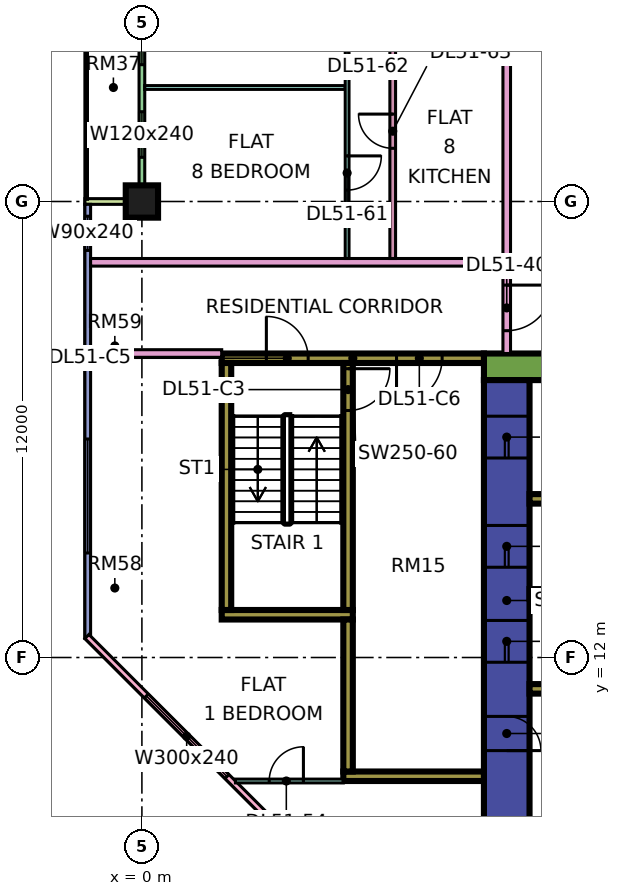
"""IFC4 building model, lengths in metres.
Left out: names, types, materials, properties, quantities, classifications, styles, units other than length and angle.
Written with IfcOpenShell. Run it as: python <this file> out.ifc"""

import sys

from ifc_helpers import new_model, si_unit, direction, frame, frame_2d, origin, origin_2d, place, context, subcontext, project, spatial, rectangle, extrude, element, fill, save


model = new_model("IFC4")
c1 = context("Model", 3, precision=1e-05, world=origin(), true_north=direction((0.0, 1.0)))
c2 = subcontext(c1, "Body", "Model", "MODEL_VIEW")
j1 = project(units=[si_unit("LENGTHUNIT", "METRE"), si_unit("PLANEANGLEUNIT", "RADIAN")], contexts=[c1])
p1 = place(None, origin())
s1 = spatial("IfcSite", under=j1, at=p1, CompositionType="ELEMENT")
p2 = place(p1, origin())
s2 = spatial("IfcBuilding", under=s1, at=p2, CompositionType="ELEMENT")
p3 = place(p2, frame((0.0, 0.0, 219.15)))
s3 = spatial("IfcBuildingStorey", under=s2, at=p3, CompositionType="ELEMENT", Elevation=219.15)
p4 = place(p3, frame((0.0, 24.0, 0.0), z_axis=(0.0, 0.0, 1.0), x_axis=(1.0, 0.0, 0.0)))
e1 = element("IfcColumn", 1, at=p4, inside=s3, PredefinedType="COLUMN", context=c2, shape_type="SweptSolid", body=[
    extrude(rectangle(XDim=0.85, YDim=0.85, at=origin_2d()), origin(), (0.0, 0.0, 1.0), 3.75),
])
p5 = place(p3, frame((9.0, 19.65, 0.0), z_axis=(0.0, 0.0, 1.0), x_axis=(1.0, 0.0, 0.0)))
e2 = element("IfcWall", 2, at=p5, inside=s3, PredefinedType="SHEAR", context=c2, shape_type="SweptSolid", body=[
    extrude(rectangle(XDim=25.0, YDim=0.7, at=frame_2d((12.5, 0.0))), origin(), (0.0, 0.0, 1.0), 3.75),
])
p6 = place(p5, frame((19.1, 0.0, 0.0)))
e3 = element("IfcOpeningElement", 3, at=p6, cuts=e2, PredefinedType="OPENING", context=c2, shape_type="SweptSolid", body=[
    extrude(rectangle(XDim=1.8, YDim=2.4, at=frame_2d((0.9, 1.2))), frame((0.0, 0.36, 0.0), z_axis=(0.0, -1.0, 0.0), x_axis=(1.0, 0.0, 0.0)), (0.0, 0.0, 1.0), 0.72),
])
p7 = place(p3, frame((9.6, 7.7, 0.0), z_axis=(0.0, 0.0, 1.0), x_axis=(0.0, 1.0, 0.0)))
e4 = element("IfcWall", 4, at=p7, inside=s3, PredefinedType="SHEAR", context=c2, shape_type="SweptSolid", body=[
    extrude(rectangle(XDim=11.6, YDim=1.2, at=frame_2d((5.8, 0.0))), origin(), (0.0, 0.0, 1.0), 3.75),
])
p8 = place(p7, frame((4.175, 0.0, 0.0)))
e5 = element("IfcOpeningElement", 5, at=p8, cuts=e4, PredefinedType="OPENING", context=c2, shape_type="SweptSolid", body=[
    extrude(rectangle(XDim=1.1, YDim=2.2, at=frame_2d((0.55, 1.1))), frame((0.0, 0.61, 0.0), z_axis=(0.0, -1.0, 0.0), x_axis=(1.0, 0.0, 0.0)), (0.0, 0.0, 1.0), 1.22),
])
p9 = place(p7, frame((6.675, 0.0, 0.0)))
e6 = element("IfcOpeningElement", 6, at=p9, cuts=e4, PredefinedType="OPENING", context=c2, shape_type="SweptSolid", body=[
    extrude(rectangle(XDim=1.1, YDim=2.2, at=frame_2d((0.55, 1.1))), frame((0.0, 0.61, 0.0), z_axis=(0.0, -1.0, 0.0), x_axis=(1.0, 0.0, 0.0)), (0.0, 0.0, 1.0), 1.22),
])
p10 = place(p7, frame((9.55, 0.0, 0.0)))
e7 = element("IfcOpeningElement", 7, at=p10, cuts=e4, PredefinedType="OPENING", context=c2, shape_type="SweptSolid", body=[
    extrude(rectangle(XDim=1.1, YDim=2.2, at=frame_2d((0.55, 1.1))), frame((0.0, 0.61, 0.0), z_axis=(0.0, -1.0, 0.0), x_axis=(1.0, 0.0, 0.0)), (0.0, 0.0, 1.0), 1.22),
])
p11 = place(p7, frame((1.85, 0.0, 0.0)))
e8 = element("IfcOpeningElement", 8, at=p11, cuts=e4, PredefinedType="OPENING", context=c2, shape_type="SweptSolid", body=[
    extrude(rectangle(XDim=0.9, YDim=2.1, at=frame_2d((0.45, 1.05))), frame((0.0, 0.61, 0.0), z_axis=(0.0, -1.0, 0.0), x_axis=(1.0, 0.0, 0.0)), (0.0, 0.0, 1.0), 1.22),
])
for number, where, z_axis, x_axis in (
    (9, (10.2, 11.175, 0.0), (0.0, 0.0, 1.0), (1.0, 0.0, 0.0)),
    (10, (10.2, 13.675, 0.0), (0.0, 0.0, 1.0), (1.0, 0.0, 0.0)),
    (11, (10.2, 16.175, 0.0), (0.0, 0.0, 1.0), (1.0, 0.0, 0.0)),
):
    element("IfcWall", number, at=place(p3, frame(where, z_axis=z_axis, x_axis=x_axis)), inside=s3, PredefinedType="SHEAR", context=c2, shape_type="SweptSolid", body=[
        extrude(rectangle(XDim=3.0, YDim=0.25, at=frame_2d((1.5, 0.0))), origin(), (0.0, 0.0, 1.0), 3.75),
    ])
p12 = place(p3, frame((2.1, 19.875, 0.0), z_axis=(0.0, 0.0, 1.0), x_axis=(1.0, 0.0, 0.0)))
e12 = element("IfcWall", 12, at=p12, inside=s3, PredefinedType="SHEAR", context=c2, shape_type="SweptSolid", body=[
    extrude(rectangle(XDim=6.9, YDim=0.25, at=frame_2d((3.45, 0.0))), origin(), (0.0, 0.0, 1.0), 3.75),
])
p13 = place(p12, frame((1.175, 0.0, 0.0)))
e13 = element("IfcOpeningElement", 13, at=p13, cuts=e12, PredefinedType="OPENING", context=c2, shape_type="SweptSolid", body=[
    extrude(rectangle(XDim=1.1, YDim=2.2, at=frame_2d((0.55, 1.1))), frame((0.0, 0.135, 0.0), z_axis=(0.0, -1.0, 0.0), x_axis=(1.0, 0.0, 0.0)), (0.0, 0.0, 1.0), 0.27),
])
p14 = place(p12, frame((4.6, 0.0, 0.0)))
e14 = element("IfcOpeningElement", 14, at=p14, cuts=e12, PredefinedType="OPENING", context=c2, shape_type="SweptSolid", body=[
    extrude(rectangle(XDim=1.2, YDim=2.2, at=frame_2d((0.6, 1.1))), frame((0.0, 0.135, 0.0), z_axis=(0.0, -1.0, 0.0), x_axis=(1.0, 0.0, 0.0)), (0.0, 0.0, 1.0), 0.27),
])
p15 = place(p3, frame((2.1, 13.125, 0.0), z_axis=(0.0, 0.0, 1.0), x_axis=(1.0, 0.0, 0.0)))
e15 = element("IfcWall", 15, at=p15, inside=s3, PredefinedType="SHEAR", context=c2, shape_type="SweptSolid", body=[
    extrude(rectangle(XDim=3.45, YDim=0.25, at=frame_2d((1.725, 0.0))), origin(), (0.0, 0.0, 1.0), 3.75),
])
p16 = place(p3, frame((2.225, 13.25, 0.0), z_axis=(0.0, 0.0, 1.0), x_axis=(0.0, 1.0, 0.0)))
e16 = element("IfcWall", 16, at=p16, inside=s3, PredefinedType="SHEAR", context=c2, shape_type="SweptSolid", body=[
    extrude(rectangle(XDim=6.5, YDim=0.25, at=frame_2d((3.25, 0.0))), origin(), (0.0, 0.0, 1.0), 3.75),
])
p17 = place(p3, frame((5.425, 13.25, 0.0), z_axis=(0.0, 0.0, 1.0), x_axis=(0.0, 1.0, 0.0)))
e17 = element("IfcWall", 17, at=p17, inside=s3, PredefinedType="SHEAR", context=c2, shape_type="SweptSolid", body=[
    extrude(rectangle(XDim=6.5, YDim=0.25, at=frame_2d((3.25, 0.0))), origin(), (0.0, 0.0, 1.0), 3.75),
])
p18 = place(p17, frame((5.25, 0.0, 0.0)))
e18 = element("IfcOpeningElement", 18, at=p18, cuts=e17, PredefinedType="OPENING", context=c2, shape_type="SweptSolid", body=[
    extrude(rectangle(XDim=1.1, YDim=2.2, at=frame_2d((0.55, 1.1))), frame((0.0, 0.135, 0.0), z_axis=(0.0, -1.0, 0.0), x_axis=(1.0, 0.0, 0.0)), (0.0, 0.0, 1.0), 0.27),
])
p19 = place(p3, frame((5.3, 8.875, 0.0), z_axis=(0.0, 0.0, 1.0), x_axis=(1.0, 0.0, 0.0)))
e19 = element("IfcWall", 19, at=p19, inside=s3, PredefinedType="SHEAR", context=c2, shape_type="SweptSolid", body=[
    extrude(rectangle(XDim=3.7, YDim=0.25, at=frame_2d((1.85, 0.0))), origin(), (0.0, 0.0, 1.0), 3.75),
])
p20 = place(p3, frame((5.425, 9.0, 0.0), z_axis=(0.0, 0.0, 1.0), x_axis=(0.0, 1.0, 0.0)))
e20 = element("IfcWall", 20, at=p20, inside=s3, PredefinedType="SHEAR", context=c2, shape_type="SweptSolid", body=[
    extrude(rectangle(XDim=4.0, YDim=0.25, at=frame_2d((2.0, 0.0))), origin(), (0.0, 0.0, 1.0), 3.75),
])
p21 = place(p3, frame((0.0, 35.925, 0.0), z_axis=(0.0, 0.0, 1.0), x_axis=(0.0, -1.0, 0.0)))
e21 = element("IfcWall", 21, at=p21, inside=s3, PredefinedType="SOLIDWALL", context=c2, shape_type="SweptSolid", body=[
    extrude(rectangle(XDim=11.85, YDim=0.15, at=frame_2d((5.925, 0.0))), origin(), (0.0, 0.0, 1.0), 3.35),
])
p22 = place(p21, frame((2.288, 0.0, 0.0)))
e22 = element("IfcOpeningElement", 22, at=p22, cuts=e21, PredefinedType="OPENING", context=c2, shape_type="SweptSolid", body=[
    extrude(rectangle(XDim=1.8, YDim=2.4, at=frame_2d((0.9, 1.2))), frame((0.0, 0.085, 0.0), z_axis=(0.0, -1.0, 0.0), x_axis=(1.0, 0.0, 0.0)), (0.0, 0.0, 1.0), 0.17),
])
p23 = place(p21, frame((6.525, 0.0, 0.45)))
e23 = element("IfcOpeningElement", 23, at=p23, cuts=e21, PredefinedType="OPENING", context=c2, shape_type="SweptSolid", body=[
    extrude(rectangle(XDim=1.8, YDim=2.4, at=frame_2d((0.9, 1.2))), frame((0.0, 0.085, 0.0), z_axis=(0.0, -1.0, 0.0), x_axis=(1.0, 0.0, 0.0)), (0.0, 0.0, 1.0), 0.17),
])
p24 = place(p21, frame((9.562, 0.0, 0.45)))
e24 = element("IfcOpeningElement", 24, at=p24, cuts=e21, PredefinedType="OPENING", context=c2, shape_type="SweptSolid", body=[
    extrude(rectangle(XDim=1.2, YDim=2.4, at=frame_2d((0.6, 1.2))), frame((0.0, 0.085, 0.0), z_axis=(0.0, -1.0, 0.0), x_axis=(1.0, 0.0, 0.0)), (0.0, 0.0, 1.0), 0.17),
])
p25 = place(p3, frame((-1.5, 24.0, 0.0), z_axis=(0.0, 0.0, 1.0), x_axis=(1.0, 0.0, 0.0)))
e25 = element("IfcWall", 25, at=p25, inside=s3, PredefinedType="SOLIDWALL", context=c2, shape_type="SweptSolid", body=[
    extrude(rectangle(XDim=1.5, YDim=0.15, at=frame_2d((0.75, 0.0))), origin(), (0.0, 0.0, 1.0), 3.35),
])
p26 = place(p3, frame((-1.425, 23.925, 0.0), z_axis=(0.0, 0.0, 1.0), x_axis=(0.0, -1.0, 0.0)))
e26 = element("IfcWall", 26, at=p26, inside=s3, PredefinedType="SOLIDWALL", context=c2, shape_type="SweptSolid", body=[
    extrude(rectangle(XDim=11.425, YDim=0.15, at=frame_2d((5.712, 0.0))), origin(), (0.0, 0.0, 1.0), 3.35),
])
p27 = place(p26, frame((0.312, 0.0, 0.45)))
e27 = element("IfcOpeningElement", 27, at=p27, cuts=e26, PredefinedType="OPENING", context=c2, shape_type="SweptSolid", body=[
    extrude(rectangle(XDim=0.9, YDim=2.4, at=frame_2d((0.45, 1.2))), frame((0.0, 0.085, 0.0), z_axis=(0.0, -1.0, 0.0), x_axis=(1.0, 0.0, 0.0)), (0.0, 0.0, 1.0), 0.17),
])
p28 = place(p26, frame((6.175, 0.0, 0.45)))
e28 = element("IfcOpeningElement", 28, at=p28, cuts=e26, PredefinedType="OPENING", context=c2, shape_type="SweptSolid", body=[
    extrude(rectangle(XDim=3.0, YDim=2.4, at=frame_2d((1.5, 1.2))), frame((0.0, 0.085, 0.0), z_axis=(0.0, -1.0, 0.0), x_axis=(1.0, 0.0, 0.0)), (0.0, 0.0, 1.0), 0.17),
])
p29 = place(p3, frame((-1.447, 12.553, 0.0), z_axis=(0.0, 0.0, 1.0), x_axis=(0.707106781187, -0.707106781187, 0.0)))
e29 = element("IfcWall", 29, at=p29, inside=s3, PredefinedType="SOLIDWALL", context=c2, shape_type="SweptSolid", body=[
    extrude(rectangle(XDim=19.799, YDim=0.15, at=frame_2d((9.899, 0.0))), origin(), (0.0, 0.0, 1.0), 3.35),
])
p30 = place(p29, frame((2.212, 0.0, 0.45)))
e30 = element("IfcOpeningElement", 30, at=p30, cuts=e29, PredefinedType="OPENING", context=c2, shape_type="SweptSolid", body=[
    extrude(rectangle(XDim=3.0, YDim=2.4, at=frame_2d((1.5, 1.2))), frame((0.0, 0.085, 0.0), z_axis=(0.0, -1.0, 0.0), x_axis=(1.0, 0.0, 0.0)), (0.0, 0.0, 1.0), 0.17),
])
p31 = place(p29, frame((10.216, 0.0, 0.45)))
e31 = element("IfcOpeningElement", 31, at=p31, cuts=e29, PredefinedType="OPENING", context=c2, shape_type="SweptSolid", body=[
    extrude(rectangle(XDim=3.0, YDim=2.4, at=frame_2d((1.5, 1.2))), frame((0.0, 0.085, 0.0), z_axis=(0.0, -1.0, 0.0), x_axis=(1.0, 0.0, 0.0)), (0.0, 0.0, 1.0), 0.17),
])
p32 = place(p3, frame((-1.35, 20.0, 0.0), z_axis=(0.0, 0.0, 1.0), x_axis=(1.0, 0.0, 0.0)))
e32 = element("IfcWall", 32, at=p32, inside=s3, PredefinedType="PARTITIONING", context=c2, shape_type="SweptSolid", body=[
    extrude(rectangle(XDim=3.45, YDim=0.2, at=frame_2d((1.725, 0.0))), origin(), (0.0, 0.0, 1.0), 3.35),
])
p33 = place(p3, frame((-1.35, 22.4, 0.0), z_axis=(0.0, 0.0, 1.0), x_axis=(1.0, 0.0, 0.0)))
e33 = element("IfcWall", 33, at=p33, inside=s3, PredefinedType="PARTITIONING", context=c2, shape_type="SweptSolid", body=[
    extrude(rectangle(XDim=10.85, YDim=0.2, at=frame_2d((5.425, 0.0))), origin(), (0.0, 0.0, 1.0), 3.35),
])
p34 = place(p3, frame((0.074, 27.0, 0.0), z_axis=(0.0, 0.0, 1.0), x_axis=(1.0, 0.0, 0.0)))
e34 = element("IfcWall", 34, at=p34, inside=s3, PredefinedType="PARTITIONING", context=c2, shape_type="SweptSolid", body=[
    extrude(rectangle(XDim=5.276, YDim=0.1, at=frame_2d((2.638, 0.0))), origin(), (0.0, 0.0, 1.0), 3.35),
])
p35 = place(p3, frame((2.461, 8.75, 0.0), z_axis=(0.0, 0.0, 1.0), x_axis=(1.0, 0.0, 0.0)))
e35 = element("IfcWall", 35, at=p35, inside=s3, PredefinedType="PARTITIONING", context=c2, shape_type="SweptSolid", body=[
    extrude(rectangle(XDim=2.839, YDim=0.1, at=frame_2d((1.419, 0.0))), origin(), (0.0, 0.0, 1.0), 3.35),
])
p36 = place(p35, frame((0.889, 0.0, 0.0)))
e36 = element("IfcOpeningElement", 36, at=p36, cuts=e35, PredefinedType="OPENING", context=c2, shape_type="SweptSolid", body=[
    extrude(rectangle(XDim=0.9, YDim=2.1, at=frame_2d((0.45, 1.05))), frame((0.0, 0.06, 0.0), z_axis=(0.0, -1.0, 0.0), x_axis=(1.0, 0.0, 0.0)), (0.0, 0.0, 1.0), 0.12),
])
p37 = place(p3, frame((5.4, 22.5, 0.0), z_axis=(0.0, 0.0, 1.0), x_axis=(0.0, 1.0, 0.0)))
e37 = element("IfcWall", 37, at=p37, inside=s3, PredefinedType="PARTITIONING", context=c2, shape_type="SweptSolid", body=[
    extrude(rectangle(XDim=7.55, YDim=0.1, at=frame_2d((3.775, 0.0))), origin(), (0.0, 0.0, 1.0), 3.35),
])
p38 = place(p37, frame((1.8, 0.0, 0.0)))
e38 = element("IfcOpeningElement", 38, at=p38, cuts=e37, PredefinedType="OPENING", context=c2, shape_type="SweptSolid", body=[
    extrude(rectangle(XDim=0.9, YDim=2.1, at=frame_2d((0.45, 1.05))), frame((0.0, 0.06, 0.0), z_axis=(0.0, -1.0, 0.0), x_axis=(1.0, 0.0, 0.0)), (0.0, 0.0, 1.0), 0.12),
])
p39 = place(p37, frame((5.55, 0.0, 0.0)))
e39 = element("IfcOpeningElement", 39, at=p39, cuts=e37, PredefinedType="OPENING", context=c2, shape_type="SweptSolid", body=[
    extrude(rectangle(XDim=0.9, YDim=2.1, at=frame_2d((0.45, 1.05))), frame((0.0, 0.06, 0.0), z_axis=(0.0, -1.0, 0.0), x_axis=(1.0, 0.0, 0.0)), (0.0, 0.0, 1.0), 0.12),
])
p40 = place(p3, frame((6.6, 22.5, 0.0), z_axis=(0.0, 0.0, 1.0), x_axis=(0.0, 1.0, 0.0)))
e40 = element("IfcWall", 40, at=p40, inside=s3, PredefinedType="PARTITIONING", context=c2, shape_type="SweptSolid", body=[
    extrude(rectangle(XDim=10.875, YDim=0.15, at=frame_2d((5.438, 0.0))), origin(), (0.0, 0.0, 1.0), 3.35),
])
p41 = place(p40, frame((8.4, 0.0, 0.0)))
e41 = element("IfcOpeningElement", 41, at=p41, cuts=e40, PredefinedType="OPENING", context=c2, shape_type="SweptSolid", body=[
    extrude(rectangle(XDim=0.8, YDim=2.1, at=frame_2d((0.4, 1.05))), frame((0.0, 0.085, 0.0), z_axis=(0.0, -1.0, 0.0), x_axis=(1.0, 0.0, 0.0)), (0.0, 0.0, 1.0), 0.17),
])
p42 = place(p40, frame((2.9, 0.0, 0.0)))
e42 = element("IfcOpeningElement", 42, at=p42, cuts=e40, PredefinedType="OPENING", context=c2, shape_type="SweptSolid", body=[
    extrude(rectangle(XDim=0.9, YDim=2.1, at=frame_2d((0.45, 1.05))), frame((0.0, 0.085, 0.0), z_axis=(0.0, -1.0, 0.0), x_axis=(1.0, 0.0, 0.0)), (0.0, 0.0, 1.0), 0.17),
])
p43 = place(p3, frame((9.6, 20.0, 0.0), z_axis=(0.0, 0.0, 1.0), x_axis=(0.0, 1.0, 0.0)))
e43 = element("IfcWall", 43, at=p43, inside=s3, PredefinedType="PARTITIONING", context=c2, shape_type="SweptSolid", body=[
    extrude(rectangle(XDim=42.926, YDim=0.2, at=frame_2d((21.463, 0.0))), origin(), (0.0, 0.0, 1.0), 3.35),
])
p44 = place(p43, frame((17.1, 0.0, 0.0)))
e44 = element("IfcOpeningElement", 44, at=p44, cuts=e43, PredefinedType="OPENING", context=c2, shape_type="SweptSolid", body=[
    extrude(rectangle(XDim=1.0, YDim=2.1, at=frame_2d((0.5, 1.05))), frame((0.0, 0.11, 0.0), z_axis=(0.0, -1.0, 0.0), x_axis=(1.0, 0.0, 0.0)), (0.0, 0.0, 1.0), 0.22),
])
p45 = place(p43, frame((32.1, 0.0, 0.0)))
e45 = element("IfcOpeningElement", 45, at=p45, cuts=e43, PredefinedType="OPENING", context=c2, shape_type="SweptSolid", body=[
    extrude(rectangle(XDim=1.0, YDim=2.1, at=frame_2d((0.5, 1.05))), frame((0.0, 0.11, 0.0), z_axis=(0.0, -1.0, 0.0), x_axis=(1.0, 0.0, 0.0)), (0.0, 0.0, 1.0), 0.22),
])
p46 = place(p43, frame((0.6, 0.0, 0.0)))
e46 = element("IfcOpeningElement", 46, at=p46, cuts=e43, PredefinedType="OPENING", context=c2, shape_type="SweptSolid", body=[
    extrude(rectangle(XDim=1.2, YDim=2.1, at=frame_2d((0.6, 1.05))), frame((0.0, 0.11, 0.0), z_axis=(0.0, -1.0, 0.0), x_axis=(1.0, 0.0, 0.0)), (0.0, 0.0, 1.0), 0.22),
])
p47 = place(p43, frame((14.1, 0.0, 0.0)))
e47 = element("IfcOpeningElement", 47, at=p47, cuts=e43, PredefinedType="OPENING", context=c2, shape_type="SweptSolid", body=[
    extrude(rectangle(XDim=1.0, YDim=2.1, at=frame_2d((0.5, 1.05))), frame((0.0, 0.11, 0.0), z_axis=(0.0, -1.0, 0.0), x_axis=(1.0, 0.0, 0.0)), (0.0, 0.0, 1.0), 0.22),
])
p48 = place(p23, origin())
e48 = element("IfcWindow", 48, at=p48, inside=s3, PartitioningType="SINGLE_PANEL", PredefinedType="WINDOW", context=c2, shape_type="SweptSolid", body=[
    extrude(rectangle(XDim=1.8, YDim=2.4, at=frame_2d((0.9, 1.2))), frame((0.0, 0.03, 0.0), z_axis=(0.0, -1.0, 0.0), x_axis=(1.0, 0.0, 0.0)), (0.0, 0.0, 1.0), 0.06),
])
fill(e23, e48)
p49 = place(p24, origin())
e49 = element("IfcWindow", 49, at=p49, inside=s3, PartitioningType="SINGLE_PANEL", PredefinedType="WINDOW", context=c2, shape_type="SweptSolid", body=[
    extrude(rectangle(XDim=1.2, YDim=2.4, at=frame_2d((0.6, 1.2))), frame((0.0, 0.03, 0.0), z_axis=(0.0, -1.0, 0.0), x_axis=(1.0, 0.0, 0.0)), (0.0, 0.0, 1.0), 0.06),
])
fill(e24, e49)
p50 = place(p27, origin())
e50 = element("IfcWindow", 50, at=p50, inside=s3, PartitioningType="SINGLE_PANEL", PredefinedType="WINDOW", context=c2, shape_type="SweptSolid", body=[
    extrude(rectangle(XDim=0.9, YDim=2.4, at=frame_2d((0.45, 1.2))), frame((0.0, 0.03, 0.0), z_axis=(0.0, -1.0, 0.0), x_axis=(1.0, 0.0, 0.0)), (0.0, 0.0, 1.0), 0.06),
])
fill(e27, e50)
p51 = place(p28, origin())
e51 = element("IfcWindow", 51, at=p51, inside=s3, PartitioningType="SINGLE_PANEL", PredefinedType="WINDOW", context=c2, shape_type="SweptSolid", body=[
    extrude(rectangle(XDim=3.0, YDim=2.4, at=frame_2d((1.5, 1.2))), frame((0.0, 0.03, 0.0), z_axis=(0.0, -1.0, 0.0), x_axis=(1.0, 0.0, 0.0)), (0.0, 0.0, 1.0), 0.06),
])
fill(e28, e51)
p52 = place(p30, origin())
e52 = element("IfcWindow", 52, at=p52, inside=s3, PartitioningType="SINGLE_PANEL", PredefinedType="WINDOW", context=c2, shape_type="SweptSolid", body=[
    extrude(rectangle(XDim=3.0, YDim=2.4, at=frame_2d((1.5, 1.2))), frame((0.0, 0.03, 0.0), z_axis=(0.0, -1.0, 0.0), x_axis=(1.0, 0.0, 0.0)), (0.0, 0.0, 1.0), 0.06),
])
fill(e30, e52)
p53 = place(p8, origin())
e53 = element("IfcDoor", 53, at=p53, inside=s3, OperationType="DOUBLE_DOOR_SLIDING", PredefinedType="DOOR", context=c2, shape_type="SweptSolid", body=[
    extrude(rectangle(XDim=1.1, YDim=2.2, at=frame_2d((0.55, 1.1))), frame((0.0, 0.025, 0.0), z_axis=(0.0, -1.0, 0.0), x_axis=(1.0, 0.0, 0.0)), (0.0, 0.0, 1.0), 0.05),
])
fill(e5, e53)
p54 = place(p9, origin())
e54 = element("IfcDoor", 54, at=p54, inside=s3, OperationType="DOUBLE_DOOR_SLIDING", PredefinedType="DOOR", context=c2, shape_type="SweptSolid", body=[
    extrude(rectangle(XDim=1.1, YDim=2.2, at=frame_2d((0.55, 1.1))), frame((0.0, 0.025, 0.0), z_axis=(0.0, -1.0, 0.0), x_axis=(1.0, 0.0, 0.0)), (0.0, 0.0, 1.0), 0.05),
])
fill(e6, e54)
p55 = place(p10, origin())
e55 = element("IfcDoor", 55, at=p55, inside=s3, OperationType="DOUBLE_DOOR_SLIDING", PredefinedType="DOOR", context=c2, shape_type="SweptSolid", body=[
    extrude(rectangle(XDim=1.1, YDim=2.2, at=frame_2d((0.55, 1.1))), frame((0.0, 0.025, 0.0), z_axis=(0.0, -1.0, 0.0), x_axis=(1.0, 0.0, 0.0)), (0.0, 0.0, 1.0), 0.05),
])
fill(e7, e55)
p56 = place(p18, origin())
e56 = element("IfcDoor", 56, at=p56, inside=s3, OperationType="SINGLE_SWING_RIGHT", PredefinedType="DOOR", context=c2, shape_type="SweptSolid", body=[
    extrude(rectangle(XDim=1.1, YDim=2.2, at=frame_2d((0.55, 1.1))), frame((0.0, 0.025, 0.0), z_axis=(0.0, -1.0, 0.0), x_axis=(1.0, 0.0, 0.0)), (0.0, 0.0, 1.0), 0.05),
])
fill(e18, e56)
p57 = place(p11, frame((0.9, 0.0, 0.0), z_axis=(0.0, 0.0, 1.0), x_axis=(-1.0, 0.0, 0.0)))
e57 = element("IfcDoor", 57, at=p57, inside=s3, OperationType="SINGLE_SWING_LEFT", PredefinedType="DOOR", context=c2, shape_type="SweptSolid", body=[
    extrude(rectangle(XDim=0.9, YDim=2.1, at=frame_2d((0.45, 1.05))), frame((0.0, 0.025, 0.0), z_axis=(0.0, -1.0, 0.0), x_axis=(1.0, 0.0, 0.0)), (0.0, 0.0, 1.0), 0.05),
])
fill(e8, e57)
p58 = place(p13, origin())
e58 = element("IfcDoor", 58, at=p58, inside=s3, OperationType="SINGLE_SWING_LEFT", PredefinedType="DOOR", context=c2, shape_type="SweptSolid", body=[
    extrude(rectangle(XDim=1.1, YDim=2.2, at=frame_2d((0.55, 1.1))), frame((0.0, 0.025, 0.0), z_axis=(0.0, -1.0, 0.0), x_axis=(1.0, 0.0, 0.0)), (0.0, 0.0, 1.0), 0.05),
])
fill(e13, e58)
p59 = place(p14, frame((1.2, 0.0, 0.0), z_axis=(0.0, 0.0, 1.0), x_axis=(-1.0, 0.0, 0.0)))
e59 = element("IfcDoor", 59, at=p59, inside=s3, OperationType="SINGLE_SWING_LEFT", PredefinedType="DOOR", context=c2, shape_type="SweptSolid", body=[
    extrude(rectangle(XDim=1.2, YDim=2.2, at=frame_2d((0.6, 1.1))), frame((0.0, 0.025, 0.0), z_axis=(0.0, -1.0, 0.0), x_axis=(1.0, 0.0, 0.0)), (0.0, 0.0, 1.0), 0.05),
])
fill(e14, e59)
p60 = place(p46, origin())
e60 = element("IfcDoor", 60, at=p60, inside=s3, OperationType="SINGLE_SWING_RIGHT", PredefinedType="DOOR", context=c2, shape_type="SweptSolid", body=[
    extrude(rectangle(XDim=1.2, YDim=2.1, at=frame_2d((0.6, 1.05))), frame((0.0, 0.025, 0.0), z_axis=(0.0, -1.0, 0.0), x_axis=(1.0, 0.0, 0.0)), (0.0, 0.0, 1.0), 0.05),
])
fill(e46, e60)
p61 = place(p36, frame((0.9, 0.0, 0.0), z_axis=(0.0, 0.0, 1.0), x_axis=(-1.0, 0.0, 0.0)))
e61 = element("IfcDoor", 61, at=p61, inside=s3, OperationType="SINGLE_SWING_RIGHT", PredefinedType="DOOR", context=c2, shape_type="SweptSolid", body=[
    extrude(rectangle(XDim=0.9, YDim=2.1, at=frame_2d((0.45, 1.05))), frame((0.0, 0.025, 0.0), z_axis=(0.0, -1.0, 0.0), x_axis=(1.0, 0.0, 0.0)), (0.0, 0.0, 1.0), 0.05),
])
fill(e36, e61)
p62 = place(p38, origin())
e62 = element("IfcDoor", 62, at=p62, inside=s3, OperationType="SINGLE_SWING_RIGHT", PredefinedType="DOOR", context=c2, shape_type="SweptSolid", body=[
    extrude(rectangle(XDim=0.9, YDim=2.1, at=frame_2d((0.45, 1.05))), frame((0.0, 0.025, 0.0), z_axis=(0.0, -1.0, 0.0), x_axis=(1.0, 0.0, 0.0)), (0.0, 0.0, 1.0), 0.05),
])
fill(e38, e62)
p63 = place(p42, frame((0.9, 0.0, 0.0), z_axis=(0.0, 0.0, 1.0), x_axis=(-1.0, 0.0, 0.0)))
e63 = element("IfcDoor", 63, at=p63, inside=s3, OperationType="SINGLE_SWING_RIGHT", PredefinedType="DOOR", context=c2, shape_type="SweptSolid", body=[
    extrude(rectangle(XDim=0.9, YDim=2.1, at=frame_2d((0.45, 1.05))), frame((0.0, 0.025, 0.0), z_axis=(0.0, -1.0, 0.0), x_axis=(1.0, 0.0, 0.0)), (0.0, 0.0, 1.0), 0.05),
])
fill(e42, e63)
save(model, sys.argv[1])
